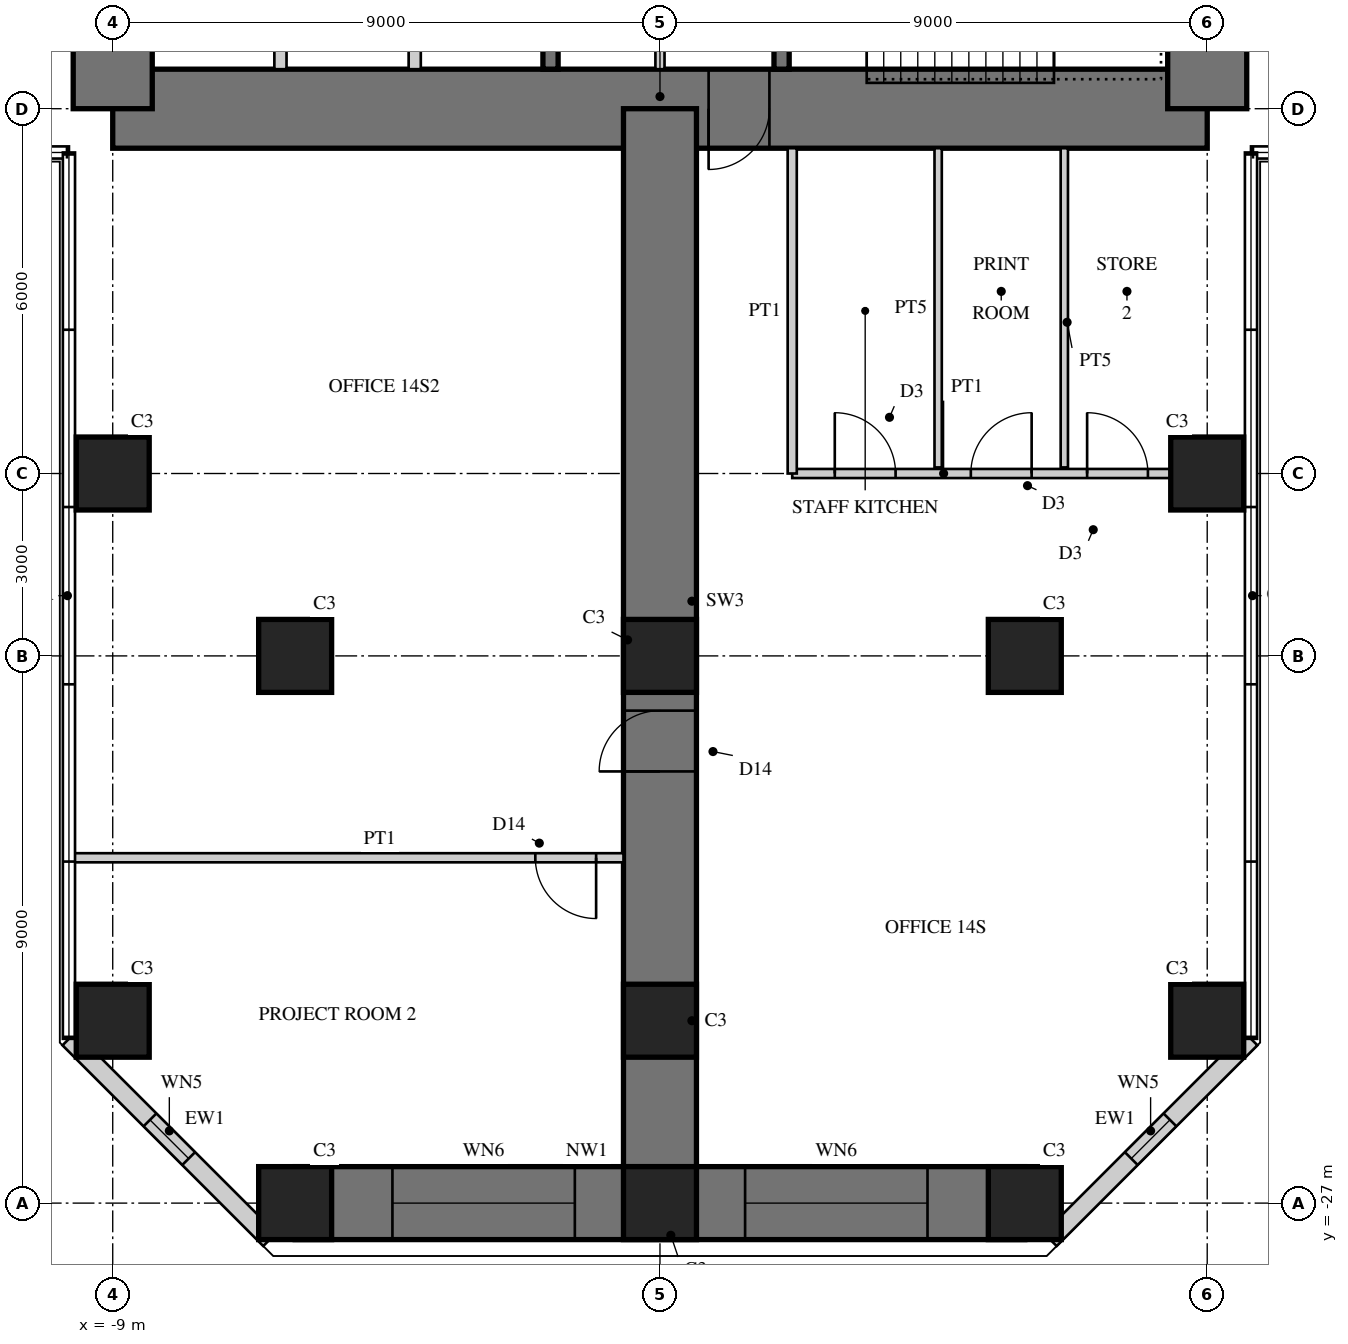
"""IFC4 building model, lengths in metres.
Left out: names, types, materials, properties, quantities, classifications, styles, units other than length and angle.
Written with IfcOpenShell. Run it as: python <this file> out.ifc"""

import sys

from ifc_helpers import new_model, si_unit, direction, frame, frame_2d, origin, origin_2d, place, context, subcontext, project, spatial, rectangle, hollow_rectangle, extrude, element, fill, save


model = new_model("IFC4")
c1 = context("Model", 3, precision=1e-05, world=origin(), true_north=direction((0.0, 1.0)))
c2 = subcontext(c1, "Body", "Model", "MODEL_VIEW")
j1 = project(units=[si_unit("LENGTHUNIT", "METRE"), si_unit("PLANEANGLEUNIT", "RADIAN")], contexts=[c1])
p1 = place(None, origin())
s1 = spatial("IfcSite", under=j1, at=p1, CompositionType="ELEMENT")
p2 = place(p1, origin())
s2 = spatial("IfcBuilding", under=s1, at=p2, CompositionType="ELEMENT")
p3 = place(p2, frame((0.0, 0.0, 59.5)))
s3 = spatial("IfcBuildingStorey", under=s2, at=p3, CompositionType="ELEMENT", Elevation=59.5)
p4 = place(p3, frame((-9.0, -9.0, 0.0), z_axis=(0.0, 0.0, 1.0), x_axis=(1.0, 0.0, 0.0)))
e1 = element("IfcWall", 1, at=p4, inside=s3, PredefinedType="SHEAR", context=c2, shape_type="SweptSolid", body=[
    extrude(rectangle(XDim=18.0, YDim=1.3, at=frame_2d((9.0, 0.0))), origin(), (0.0, 0.0, 1.0), 4.0),
])
p5 = place(p4, frame((9.8, 0.0, 0.0)))
e2 = element("IfcOpeningElement", 2, at=p5, cuts=e1, PredefinedType="OPENING", context=c2, shape_type="SweptSolid", body=[
    extrude(rectangle(XDim=1.0, YDim=2.4, at=frame_2d((0.5, 1.2))), frame((0.0, 0.66, 0.0), z_axis=(0.0, -1.0, 0.0), x_axis=(1.0, 0.0, 0.0)), (0.0, 0.0, 1.0), 1.32),
])
p6 = place(p3, frame((9.0, -9.0, 0.0), z_axis=(0.0, 0.0, 1.0), x_axis=(0.0, 1.0, 0.0)))
e3 = element("IfcWall", 3, at=p6, inside=s3, PredefinedType="SHEAR", context=c2, shape_type="SweptSolid", body=[
    extrude(rectangle(XDim=18.0, YDim=1.3, at=frame_2d((9.0, 0.0))), origin(), (0.0, 0.0, 1.0), 4.0),
])
p7 = place(p6, frame((9.8, 0.0, 0.0)))
e4 = element("IfcOpeningElement", 4, at=p7, cuts=e3, PredefinedType="OPENING", context=c2, shape_type="SweptSolid", body=[
    extrude(rectangle(XDim=1.0, YDim=2.4, at=frame_2d((0.5, 1.2))), frame((0.0, 0.66, 0.0), z_axis=(0.0, -1.0, 0.0), x_axis=(1.0, 0.0, 0.0)), (0.0, 0.0, 1.0), 1.32),
])
p8 = place(p3, frame((-9.0, 9.0, 0.0), z_axis=(0.0, 0.0, 1.0), x_axis=(0.0, -1.0, 0.0)))
e5 = element("IfcWall", 5, at=p8, inside=s3, PredefinedType="SHEAR", context=c2, shape_type="SweptSolid", body=[
    extrude(rectangle(XDim=18.0, YDim=1.3, at=frame_2d((9.0, 0.0))), origin(), (0.0, 0.0, 1.0), 4.0),
])
p9 = place(p8, frame((9.8, 0.0, 0.0)))
e6 = element("IfcOpeningElement", 6, at=p9, cuts=e5, PredefinedType="OPENING", context=c2, shape_type="SweptSolid", body=[
    extrude(rectangle(XDim=1.0, YDim=2.4, at=frame_2d((0.5, 1.2))), frame((0.0, 0.66, 0.0), z_axis=(0.0, -1.0, 0.0), x_axis=(1.0, 0.0, 0.0)), (0.0, 0.0, 1.0), 1.32),
])
p10 = place(p3, frame((-1.8, -1.875, 0.0), z_axis=(0.0, 0.0, 1.0), x_axis=(0.0, -1.0, 0.0)))
e7 = element("IfcWall", 7, at=p10, inside=s3, PredefinedType="SHEAR", context=c2, shape_type="SweptSolid", body=[
    extrude(rectangle(XDim=6.475, YDim=0.25, at=frame_2d((3.238, 0.0))), origin(), (0.0, 0.0, 1.0), 4.0),
])
p11 = place(p10, frame((1.875, 0.0, 0.0)))
e8 = element("IfcOpeningElement", 8, at=p11, cuts=e7, PredefinedType="OPENING", context=c2, shape_type="SweptSolid", body=[
    extrude(rectangle(XDim=1.6, YDim=2.4, at=frame_2d((0.8, 1.2))), frame((0.0, 0.135, 0.0), z_axis=(0.0, -1.0, 0.0), x_axis=(1.0, 0.0, 0.0)), (0.0, 0.0, 1.0), 0.27),
])
for number, where, z_axis, x_axis in (
    (9, (-4.033, -5.975, 0.0), (0.0, 0.0, 1.0), (0.0, -1.0, 0.0)),
    (10, (-6.242, -5.975, 0.0), (0.0, 0.0, 1.0), (0.0, -1.0, 0.0)),
):
    element("IfcWall", number, at=place(p3, frame(where, z_axis=z_axis, x_axis=x_axis)), inside=s3, PredefinedType="PARTITIONING", context=c2, shape_type="SweptSolid", body=[
        extrude(rectangle(XDim=2.375, YDim=0.2, at=frame_2d((1.188, 0.0))), origin(), (0.0, 0.0, 1.0), 4.0),
    ])
p12 = place(p3, frame((2.0, -1.675, 0.0), z_axis=(0.0, 0.0, 1.0), x_axis=(0.0, -1.0, 0.0)))
e11 = element("IfcWall", 11, at=p12, inside=s3, PredefinedType="SHEAR", context=c2, shape_type="SweptSolid", body=[
    extrude(rectangle(XDim=6.675, YDim=0.25, at=frame_2d((3.337, 0.0))), origin(), (0.0, 0.0, 1.0), 4.0),
])
p13 = place(p12, frame((0.725, 0.0, 0.0)))
e12 = element("IfcOpeningElement", 12, at=p13, cuts=e11, PredefinedType="OPENING", context=c2, shape_type="SweptSolid", body=[
    extrude(rectangle(XDim=1.0, YDim=2.1, at=frame_2d((0.5, 1.05))), frame((0.0, 0.135, 0.0), z_axis=(0.0, -1.0, 0.0), x_axis=(1.0, 0.0, 0.0)), (0.0, 0.0, 1.0), 0.27),
])
p14 = place(p3, frame((0.0, -9.0, 0.0), z_axis=(0.0, 0.0, 1.0), x_axis=(0.0, -1.0, 0.0)))
e13 = element("IfcWall", 13, at=p14, inside=s3, PredefinedType="SHEAR", context=c2, shape_type="SweptSolid", body=[
    extrude(rectangle(XDim=18.0, YDim=1.2, at=frame_2d((9.0, 0.0))), origin(), (0.0, 0.0, 1.0), 4.0),
])
p15 = place(p14, frame((9.9, 0.0, 0.0)))
e14 = element("IfcOpeningElement", 14, at=p15, cuts=e13, PredefinedType="OPENING", context=c2, shape_type="SweptSolid", body=[
    extrude(rectangle(XDim=1.0, YDim=2.2, at=frame_2d((0.5, 1.1))), frame((0.0, 0.61, 0.0), z_axis=(0.0, -1.0, 0.0), x_axis=(1.0, 0.0, 0.0)), (0.0, 0.0, 1.0), 1.22),
])
p16 = place(p3, frame((-6.0, -27.0, 0.0), z_axis=(0.0, 0.0, 1.0), x_axis=(1.0, 0.0, 0.0)))
e15 = element("IfcWall", 15, at=p16, inside=s3, PredefinedType="SHEAR", context=c2, shape_type="SweptSolid", body=[
    extrude(rectangle(XDim=12.0, YDim=1.2, at=frame_2d((6.0, 0.0))), origin(), (0.0, 0.0, 1.0), 4.0),
])
p17 = place(p16, frame((1.6, 0.0, 0.6)))
e16 = element("IfcOpeningElement", 16, at=p17, cuts=e15, PredefinedType="OPENING", context=c2, shape_type="SweptSolid", body=[
    extrude(rectangle(XDim=3.0, YDim=2.4, at=frame_2d((1.5, 1.2))), frame((0.0, 0.61, 0.0), z_axis=(0.0, -1.0, 0.0), x_axis=(1.0, 0.0, 0.0)), (0.0, 0.0, 1.0), 1.22),
])
p18 = place(p16, frame((7.4, 0.0, 0.6)))
e17 = element("IfcOpeningElement", 17, at=p18, cuts=e15, PredefinedType="OPENING", context=c2, shape_type="SweptSolid", body=[
    extrude(rectangle(XDim=3.0, YDim=2.4, at=frame_2d((1.5, 1.2))), frame((0.0, 0.61, 0.0), z_axis=(0.0, -1.0, 0.0), x_axis=(1.0, 0.0, 0.0)), (0.0, 0.0, 1.0), 1.22),
])
for number, where, z_axis, x_axis in (
    (18, (-9.0, -15.0, 0.0), (0.0, 0.0, 1.0), (1.0, 0.0, 0.0)),
    (19, (-9.0, -24.0, 0.0), (0.0, 0.0, 1.0), (1.0, 0.0, 0.0)),
    (20, (9.0, -15.0, 0.0), (0.0, 0.0, 1.0), (1.0, 0.0, 0.0)),
    (21, (9.0, -24.0, 0.0), (0.0, 0.0, 1.0), (1.0, 0.0, 0.0)),
    (22, (-6.0, -27.0, 0.0), (0.0, 0.0, 1.0), (1.0, 0.0, 0.0)),
    (23, (0.0, -27.0, 0.0), (0.0, 0.0, 1.0), (1.0, 0.0, 0.0)),
    (24, (6.0, -27.0, 0.0), (0.0, 0.0, 1.0), (1.0, 0.0, 0.0)),
    (25, (-6.0, -18.0, 0.0), (0.0, 0.0, 1.0), (1.0, 0.0, 0.0)),
    (26, (0.0, -18.0, 0.0), (0.0, 0.0, 1.0), (1.0, 0.0, 0.0)),
    (27, (6.0, -18.0, 0.0), (0.0, 0.0, 1.0), (1.0, 0.0, 0.0)),
    (28, (0.0, -24.0, 0.0), (0.0, 0.0, 1.0), (1.0, 0.0, 0.0)),
):
    element("IfcColumn", number, at=place(p3, frame(where, z_axis=z_axis, x_axis=x_axis)), inside=s3, PredefinedType="COLUMN", context=c2, shape_type="SweptSolid", body=[
        extrude(rectangle(XDim=1.2, YDim=1.2, at=origin_2d()), origin(), (0.0, 0.0, 1.0), 4.0),
    ])
p19 = place(p3, frame((-9.72, -24.298, 0.0), z_axis=(0.0, 0.0, 1.0), x_axis=(0.707106781187, -0.707106781187, 0.0)))
e29 = element("IfcWall", 29, at=p19, inside=s3, PredefinedType="SOLIDWALL", context=c2, shape_type="SweptSolid", body=[
    extrude(rectangle(XDim=4.669, YDim=0.3, at=frame_2d((2.335, 0.0))), origin(), (0.0, 0.0, 1.0), 3.8),
])
p20 = place(p19, frame((1.885, 0.0, 0.3)))
e30 = element("IfcOpeningElement", 30, at=p20, cuts=e29, PredefinedType="OPENING", context=c2, shape_type="SweptSolid", body=[
    extrude(rectangle(XDim=0.9, YDim=2.4, at=frame_2d((0.45, 1.2))), frame((0.0, 0.16, 0.0), z_axis=(0.0, -1.0, 0.0), x_axis=(1.0, 0.0, 0.0)), (0.0, 0.0, 1.0), 0.32),
])
p21 = place(p3, frame((6.418, -27.6, 0.0), z_axis=(0.0, 0.0, 1.0), x_axis=(0.707106781187, 0.707106781187, 0.0)))
e31 = element("IfcWall", 31, at=p21, inside=s3, PredefinedType="SOLIDWALL", context=c2, shape_type="SweptSolid", body=[
    extrude(rectangle(XDim=4.669, YDim=0.3, at=frame_2d((2.335, 0.0))), origin(), (0.0, 0.0, 1.0), 3.8),
])
p22 = place(p21, frame((1.885, 0.0, 0.3)))
e32 = element("IfcOpeningElement", 32, at=p22, cuts=e31, PredefinedType="OPENING", context=c2, shape_type="SweptSolid", body=[
    extrude(rectangle(XDim=0.9, YDim=2.4, at=frame_2d((0.45, 1.2))), frame((0.0, 0.16, 0.0), z_axis=(0.0, -1.0, 0.0), x_axis=(1.0, 0.0, 0.0)), (0.0, 0.0, 1.0), 0.32),
])
p23 = place(p3, frame((0.0, -5.675, 0.0), z_axis=(0.0, 0.0, 1.0), x_axis=(0.0, -1.0, 0.0)))
e33 = element("IfcWall", 33, at=p23, inside=s3, PredefinedType="PARTITIONING", context=c2, shape_type="SweptSolid", body=[
    extrude(rectangle(XDim=2.675, YDim=0.15, at=frame_2d((1.337, 0.0))), origin(), (0.0, 0.0, 1.0), 3.8),
])
p24 = place(p23, frame((0.4, 0.0, 0.0)))
e34 = element("IfcOpeningElement", 34, at=p24, cuts=e33, PredefinedType="OPENING", context=c2, shape_type="SweptSolid", body=[
    extrude(rectangle(XDim=1.0, YDim=2.1, at=frame_2d((0.5, 1.05))), frame((0.0, 0.085, 0.0), z_axis=(0.0, -1.0, 0.0), x_axis=(1.0, 0.0, 0.0)), (0.0, 0.0, 1.0), 0.17),
])
p25 = place(p3, frame((2.175, -15.0, 0.0), z_axis=(0.0, 0.0, 1.0), x_axis=(1.0, 0.0, 0.0)))
e35 = element("IfcWall", 35, at=p25, inside=s3, PredefinedType="PARTITIONING", context=c2, shape_type="SweptSolid", body=[
    extrude(rectangle(XDim=6.225, YDim=0.15, at=frame_2d((3.112, 0.0))), origin(), (0.0, 0.0, 1.0), 2.95),
])
p26 = place(p25, frame((0.7, 0.0, 0.0)))
e36 = element("IfcOpeningElement", 36, at=p26, cuts=e35, PredefinedType="OPENING", context=c2, shape_type="SweptSolid", body=[
    extrude(rectangle(XDim=1.0, YDim=2.1, at=frame_2d((0.5, 1.05))), frame((0.0, 0.085, 0.0), z_axis=(0.0, -1.0, 0.0), x_axis=(1.0, 0.0, 0.0)), (0.0, 0.0, 1.0), 0.17),
])
p27 = place(p25, frame((2.938, 0.0, 0.0)))
e37 = element("IfcOpeningElement", 37, at=p27, cuts=e35, PredefinedType="OPENING", context=c2, shape_type="SweptSolid", body=[
    extrude(rectangle(XDim=1.0, YDim=2.1, at=frame_2d((0.5, 1.05))), frame((0.0, 0.085, 0.0), z_axis=(0.0, -1.0, 0.0), x_axis=(1.0, 0.0, 0.0)), (0.0, 0.0, 1.0), 0.17),
])
p28 = place(p25, frame((4.85, 0.0, 0.0)))
e38 = element("IfcOpeningElement", 38, at=p28, cuts=e35, PredefinedType="OPENING", context=c2, shape_type="SweptSolid", body=[
    extrude(rectangle(XDim=1.0, YDim=2.1, at=frame_2d((0.5, 1.05))), frame((0.0, 0.085, 0.0), z_axis=(0.0, -1.0, 0.0), x_axis=(1.0, 0.0, 0.0)), (0.0, 0.0, 1.0), 0.17),
])
p29 = place(p3, frame((2.175, -9.65, 0.0), z_axis=(0.0, 0.0, 1.0), x_axis=(0.0, -1.0, 0.0)))
e39 = element("IfcWall", 39, at=p29, inside=s3, PredefinedType="PARTITIONING", context=c2, shape_type="SweptSolid", body=[
    extrude(rectangle(XDim=5.35, YDim=0.15, at=frame_2d((2.675, 0.0))), origin(), (0.0, 0.0, 1.0), 3.8),
])
for number, where, z_axis, x_axis in (
    (40, (4.575, -9.65, 0.0), (0.0, 0.0, 1.0), (0.0, -1.0, 0.0)),
    (41, (6.65, -9.65, 0.0), (0.0, 0.0, 1.0), (0.0, -1.0, 0.0)),
):
    element("IfcWall", number, at=place(p3, frame(where, z_axis=z_axis, x_axis=x_axis)), inside=s3, PredefinedType="PLUMBINGWALL", context=c2, shape_type="SweptSolid", body=[
        extrude(rectangle(XDim=5.25, YDim=0.12, at=frame_2d((2.625, 0.0))), origin(), (0.0, 0.0, 1.0), 3.8),
    ])
p30 = place(p3, frame((-9.68, -21.32, 0.0), z_axis=(0.0, 0.0, 1.0), x_axis=(1.0, 0.0, 0.0)))
e42 = element("IfcWall", 42, at=p30, inside=s3, PredefinedType="PARTITIONING", context=c2, shape_type="SweptSolid", body=[
    extrude(rectangle(XDim=9.08, YDim=0.15, at=frame_2d((4.54, 0.0))), origin(), (0.0, 0.0, 1.0), 3.8),
])
p31 = place(p30, frame((7.63, 0.0, 0.0)))
e43 = element("IfcOpeningElement", 43, at=p31, cuts=e42, PredefinedType="OPENING", context=c2, shape_type="SweptSolid", body=[
    extrude(rectangle(XDim=1.0, YDim=2.2, at=frame_2d((0.5, 1.1))), frame((0.0, 0.085, 0.0), z_axis=(0.0, -1.0, 0.0), x_axis=(1.0, 0.0, 0.0)), (0.0, 0.0, 1.0), 0.17),
])
p32 = place(p20, origin())
e44 = element("IfcWindow", 44, at=p32, inside=s3, PartitioningType="SINGLE_PANEL", PredefinedType="WINDOW", context=c2, shape_type="SweptSolid", body=[
    extrude(hollow_rectangle(XDim=0.9, YDim=2.4, WallThickness=0.06, at=frame_2d((0.45, 1.2))), frame((0.0, 0.03, 0.0), z_axis=(0.0, -1.0, 0.0), x_axis=(1.0, 0.0, 0.0)), (0.0, 0.0, 1.0), 0.06),
    extrude(rectangle(XDim=0.779, YDim=2.279, at=frame_2d((0.45, 1.2))), frame((0.0, 0.03, 0.0), z_axis=(0.0, -1.0, 0.0), x_axis=(1.0, 0.0, 0.0)), (0.0, 0.0, 1.0), 0.06),
])
fill(e30, e44)
p33 = place(p17, origin())
e45 = element("IfcWindow", 45, at=p33, inside=s3, PartitioningType="SINGLE_PANEL", PredefinedType="WINDOW", context=c2, shape_type="SweptSolid", body=[
    extrude(hollow_rectangle(XDim=3.0, YDim=2.4, WallThickness=0.06, at=frame_2d((1.5, 1.2))), frame((0.0, 0.03, 0.0), z_axis=(0.0, -1.0, 0.0), x_axis=(1.0, 0.0, 0.0)), (0.0, 0.0, 1.0), 0.06),
    extrude(rectangle(XDim=2.879, YDim=2.279, at=frame_2d((1.5, 1.2))), frame((0.0, 0.03, 0.0), z_axis=(0.0, -1.0, 0.0), x_axis=(1.0, 0.0, 0.0)), (0.0, 0.0, 1.0), 0.06),
])
fill(e16, e45)
p34 = place(p18, origin())
e46 = element("IfcWindow", 46, at=p34, inside=s3, PartitioningType="SINGLE_PANEL", PredefinedType="WINDOW", context=c2, shape_type="SweptSolid", body=[
    extrude(hollow_rectangle(XDim=3.0, YDim=2.4, WallThickness=0.06, at=frame_2d((1.5, 1.2))), frame((0.0, 0.03, 0.0), z_axis=(0.0, -1.0, 0.0), x_axis=(1.0, 0.0, 0.0)), (0.0, 0.0, 1.0), 0.06),
    extrude(rectangle(XDim=2.879, YDim=2.279, at=frame_2d((1.5, 1.2))), frame((0.0, 0.03, 0.0), z_axis=(0.0, -1.0, 0.0), x_axis=(1.0, 0.0, 0.0)), (0.0, 0.0, 1.0), 0.06),
])
fill(e17, e46)
p35 = place(p22, origin())
e47 = element("IfcWindow", 47, at=p35, inside=s3, PartitioningType="SINGLE_PANEL", PredefinedType="WINDOW", context=c2, shape_type="SweptSolid", body=[
    extrude(hollow_rectangle(XDim=0.9, YDim=2.4, WallThickness=0.06, at=frame_2d((0.45, 1.2))), frame((0.0, 0.03, 0.0), z_axis=(0.0, -1.0, 0.0), x_axis=(1.0, 0.0, 0.0)), (0.0, 0.0, 1.0), 0.06),
    extrude(rectangle(XDim=0.779, YDim=2.279, at=frame_2d((0.45, 1.2))), frame((0.0, 0.03, 0.0), z_axis=(0.0, -1.0, 0.0), x_axis=(1.0, 0.0, 0.0)), (0.0, 0.0, 1.0), 0.06),
])
fill(e32, e47)
p36 = place(p26, origin())
e48 = element("IfcDoor", 48, at=p36, inside=s3, OperationType="SINGLE_SWING_LEFT", PredefinedType="DOOR", context=c2, shape_type="SweptSolid", body=[
    extrude(rectangle(XDim=1.0, YDim=2.1, at=frame_2d((0.5, 1.05))), frame((0.0, 0.025, 0.0), z_axis=(0.0, -1.0, 0.0), x_axis=(1.0, 0.0, 0.0)), (0.0, 0.0, 1.0), 0.05),
])
fill(e36, e48)
p37 = place(p27, origin())
e49 = element("IfcDoor", 49, at=p37, inside=s3, OperationType="SINGLE_SWING_RIGHT", PredefinedType="DOOR", context=c2, shape_type="SweptSolid", body=[
    extrude(rectangle(XDim=1.0, YDim=2.1, at=frame_2d((0.5, 1.05))), frame((0.0, 0.025, 0.0), z_axis=(0.0, -1.0, 0.0), x_axis=(1.0, 0.0, 0.0)), (0.0, 0.0, 1.0), 0.05),
])
fill(e37, e49)
p38 = place(p28, origin())
e50 = element("IfcDoor", 50, at=p38, inside=s3, OperationType="SINGLE_SWING_LEFT", PredefinedType="DOOR", context=c2, shape_type="SweptSolid", body=[
    extrude(rectangle(XDim=1.0, YDim=2.1, at=frame_2d((0.5, 1.05))), frame((0.0, 0.025, 0.0), z_axis=(0.0, -1.0, 0.0), x_axis=(1.0, 0.0, 0.0)), (0.0, 0.0, 1.0), 0.05),
])
fill(e38, e50)
p39 = place(p31, frame((1.0, 0.0, 0.0), z_axis=(0.0, 0.0, 1.0), x_axis=(-1.0, 0.0, 0.0)))
e51 = element("IfcDoor", 51, at=p39, inside=s3, OperationType="SINGLE_SWING_LEFT", PredefinedType="DOOR", context=c2, shape_type="SweptSolid", body=[
    extrude(rectangle(XDim=1.0, YDim=2.2, at=frame_2d((0.5, 1.1))), frame((0.0, 0.025, 0.0), z_axis=(0.0, -1.0, 0.0), x_axis=(1.0, 0.0, 0.0)), (0.0, 0.0, 1.0), 0.05),
])
fill(e43, e51)
p40 = place(p15, frame((1.0, 0.0, 0.0), z_axis=(0.0, 0.0, 1.0), x_axis=(-1.0, 0.0, 0.0)))
e52 = element("IfcDoor", 52, at=p40, inside=s3, OperationType="SINGLE_SWING_LEFT", PredefinedType="DOOR", context=c2, shape_type="SweptSolid", body=[
    extrude(rectangle(XDim=1.0, YDim=2.2, at=frame_2d((0.5, 1.1))), frame((0.0, 0.025, 0.0), z_axis=(0.0, -1.0, 0.0), x_axis=(1.0, 0.0, 0.0)), (0.0, 0.0, 1.0), 0.05),
])
fill(e14, e52)
p41 = place(p5, frame((1.0, 0.0, 0.0), z_axis=(0.0, 0.0, 1.0), x_axis=(-1.0, 0.0, 0.0)))
e53 = element("IfcDoor", 53, at=p41, inside=s3, OperationType="SINGLE_SWING_RIGHT", PredefinedType="DOOR", context=c2, shape_type="SweptSolid", body=[
    extrude(rectangle(XDim=1.0, YDim=2.4, at=frame_2d((0.5, 1.2))), frame((0.0, -0.005, 0.0), z_axis=(0.0, -1.0, 0.0), x_axis=(1.0, 0.0, 0.0)), (0.0, 0.0, 1.0), 0.05),
])
fill(e2, e53)
save(model, sys.argv[1])
